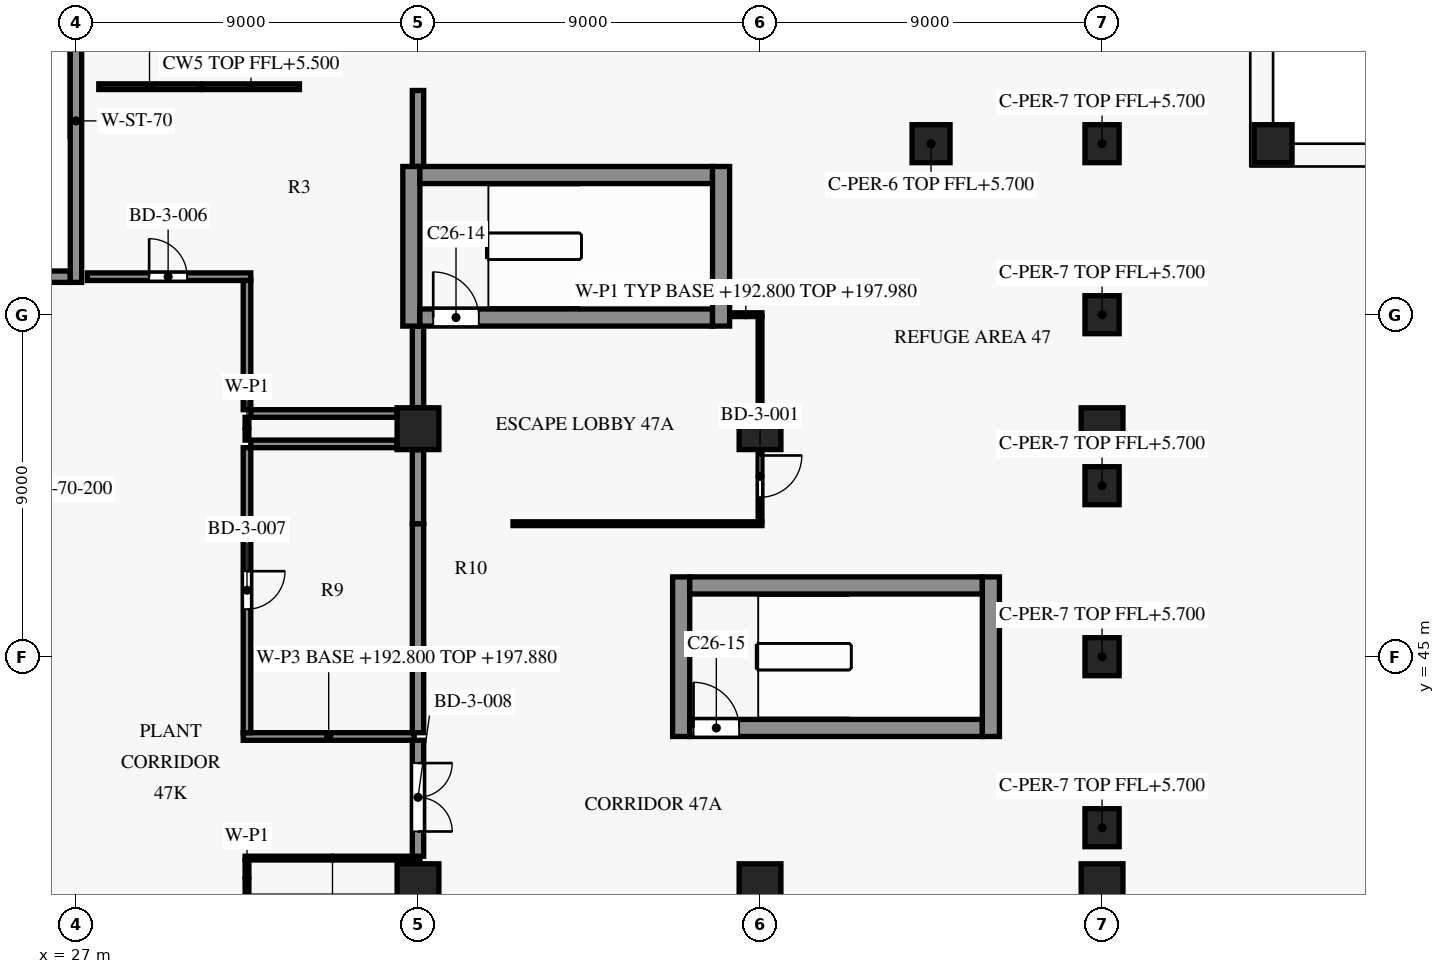
"""IFC4 building model, lengths in metres.
Left out: names, types, materials, properties, quantities, classifications, styles, units other than length and angle.
Written with IfcOpenShell. Run it as: python <this file> out.ifc"""

import sys

from ifc_helpers import new_model, si_unit, direction, frame, frame_2d, origin, origin_2d, place, context, subcontext, project, spatial, rectangle, extrude, element, fill, save


model = new_model("IFC4")
c1 = context("Model", 3, precision=1e-05, world=origin(), true_north=direction((0.0, 1.0)))
c2 = subcontext(c1, "Body", "Model", "MODEL_VIEW")
j1 = project(units=[si_unit("LENGTHUNIT", "METRE"), si_unit("PLANEANGLEUNIT", "RADIAN")], contexts=[c1])
p1 = place(None, origin())
s1 = spatial("IfcSite", under=j1, at=p1, CompositionType="ELEMENT")
p2 = place(p1, origin())
s2 = spatial("IfcBuilding", under=s1, at=p2, CompositionType="ELEMENT")
p3 = place(p2, frame((0.0, 0.0, 192.8)))
s3 = spatial("IfcBuildingStorey", under=s2, at=p3, CompositionType="ELEMENT", Elevation=192.8)
p4 = place(p3, frame((58.5, 58.5, 0.0), z_axis=(0.0, 0.0, 1.0), x_axis=(1.0, 0.0, 0.0)))
e1 = element("IfcColumn", 1, at=p4, inside=s3, PredefinedType="COLUMN", context=c2, shape_type="SweptSolid", body=[
    extrude(rectangle(XDim=1.0, YDim=1.0, at=origin_2d()), origin(), (0.0, 0.0, 1.0), 6.0),
])
for number, where, z_axis, x_axis in (
    (2, (36.0, 39.0, 0.0), (0.0, 0.0, 1.0), (1.0, 0.0, 0.0)),
    (3, (36.0, 51.0, 0.0), (0.0, 0.0, 1.0), (1.0, 0.0, 0.0)),
    (4, (45.0, 39.0, 0.0), (0.0, 0.0, 1.0), (1.0, 0.0, 0.0)),
    (5, (45.0, 51.0, 0.0), (0.0, 0.0, 1.0), (1.0, 0.0, 0.0)),
    (6, (54.0, 39.0, 0.0), (0.0, 0.0, 1.0), (1.0, 0.0, 0.0)),
    (7, (54.0, 51.0, 0.0), (0.0, 0.0, 1.0), (1.0, 0.0, 0.0)),
):
    element("IfcColumn", number, at=place(p3, frame(where, z_axis=z_axis, x_axis=x_axis)), inside=s3, PredefinedType="COLUMN", context=c2, shape_type="SweptSolid", body=[
        extrude(rectangle(XDim=1.1, YDim=1.1, at=origin_2d()), origin(), (0.0, 0.0, 1.0), 6.0),
    ])
p5 = place(p3, frame((43.15, 43.125, 0.0), z_axis=(0.0, 0.0, 1.0), x_axis=(1.0, 0.0, 0.0)))
e8 = element("IfcWall", 8, at=p5, inside=s3, PredefinedType="SHEAR", context=c2, shape_type="SweptSolid", body=[
    extrude(rectangle(XDim=7.7, YDim=0.45, at=frame_2d((3.85, 0.0))), origin(), (0.0, 0.0, 1.0), 5.7),
])
p6 = place(p5, frame((0.1, 0.0, 0.0)))
e9 = element("IfcOpeningElement", 9, at=p6, cuts=e8, PredefinedType="OPENING", context=c2, shape_type="SweptSolid", body=[
    extrude(rectangle(XDim=1.2, YDim=2.2, at=frame_2d((0.6, 1.1))), frame((0.0, 0.235, 0.0), z_axis=(0.0, -1.0, 0.0), x_axis=(1.0, 0.0, 0.0)), (0.0, 0.0, 1.0), 0.47),
])
p7 = place(p3, frame((43.15, 46.875, 0.0), z_axis=(0.0, 0.0, 1.0), x_axis=(1.0, 0.0, 0.0)))
e10 = element("IfcWall", 10, at=p7, inside=s3, PredefinedType="SHEAR", context=c2, shape_type="SweptSolid", body=[
    extrude(rectangle(XDim=7.7, YDim=0.45, at=frame_2d((3.85, 0.0))), origin(), (0.0, 0.0, 1.0), 5.7),
])
p8 = place(p3, frame((36.05, 53.925, 0.0), z_axis=(0.0, 0.0, 1.0), x_axis=(1.0, 0.0, 0.0)))
e11 = element("IfcWall", 11, at=p8, inside=s3, PredefinedType="SHEAR", context=c2, shape_type="SweptSolid", body=[
    extrude(rectangle(XDim=7.7, YDim=0.45, at=frame_2d((3.85, 0.0))), origin(), (0.0, 0.0, 1.0), 5.7),
])
p9 = place(p8, frame((0.35, 0.0, 0.0)))
e12 = element("IfcOpeningElement", 12, at=p9, cuts=e11, PredefinedType="OPENING", context=c2, shape_type="SweptSolid", body=[
    extrude(rectangle(XDim=1.2, YDim=2.2, at=frame_2d((0.6, 1.1))), frame((0.0, 0.235, 0.0), z_axis=(0.0, -1.0, 0.0), x_axis=(1.0, 0.0, 0.0)), (0.0, 0.0, 1.0), 0.47),
])
p10 = place(p3, frame((23.4, 55.0, 0.0), z_axis=(0.0, 0.0, 1.0), x_axis=(1.0, 0.0, 0.0)))
e13 = element("IfcWall", 13, at=p10, inside=s3, PredefinedType="SHEAR", context=c2, shape_type="SweptSolid", body=[
    extrude(rectangle(XDim=3.45, YDim=0.3, at=frame_2d((1.725, 0.0))), origin(), (0.0, 0.0, 1.0), 5.7),
])
p11 = place(p3, frame((36.05, 57.675, 0.0), z_axis=(0.0, 0.0, 1.0), x_axis=(1.0, 0.0, 0.0)))
e14 = element("IfcWall", 14, at=p11, inside=s3, PredefinedType="SHEAR", context=c2, shape_type="SweptSolid", body=[
    extrude(rectangle(XDim=7.7, YDim=0.45, at=frame_2d((3.85, 0.0))), origin(), (0.0, 0.0, 1.0), 5.7),
])
p12 = place(p3, frame((27.0, 54.85, 0.0), z_axis=(0.0, 0.0, 1.0), x_axis=(0.0, 1.0, 0.0)))
e15 = element("IfcWall", 15, at=p12, inside=s3, PredefinedType="SHEAR", context=c2, shape_type="SweptSolid", body=[
    extrude(rectangle(XDim=8.5, YDim=0.3, at=frame_2d((4.25, 0.0))), origin(), (0.0, 0.0, 1.0), 5.7),
])
p13 = place(p12, frame((6.55, 0.0, 0.0)))
e16 = element("IfcOpeningElement", 16, at=p13, cuts=e15, PredefinedType="OPENING", context=c2, shape_type="SweptSolid", body=[
    extrude(rectangle(XDim=1.2, YDim=2.2, at=frame_2d((0.6, 1.1))), frame((0.0, 0.16, 0.0), z_axis=(0.0, -1.0, 0.0), x_axis=(1.0, 0.0, 0.0)), (0.0, 0.0, 1.0), 0.32),
])
p14 = place(p3, frame((35.825, 53.7, 0.0), z_axis=(0.0, 0.0, 1.0), x_axis=(0.0, 1.0, 0.0)))
e17 = element("IfcWall", 17, at=p14, inside=s3, PredefinedType="SHEAR", context=c2, shape_type="SweptSolid", body=[
    extrude(rectangle(XDim=4.2, YDim=0.45, at=frame_2d((2.1, 0.0))), origin(), (0.0, 0.0, 1.0), 5.7),
])
p15 = place(p3, frame((42.925, 42.9, 0.0), z_axis=(0.0, 0.0, 1.0), x_axis=(0.0, 1.0, 0.0)))
e18 = element("IfcWall", 18, at=p15, inside=s3, PredefinedType="SHEAR", context=c2, shape_type="SweptSolid", body=[
    extrude(rectangle(XDim=4.2, YDim=0.45, at=frame_2d((2.1, 0.0))), origin(), (0.0, 0.0, 1.0), 5.7),
])
p16 = place(p3, frame((43.975, 53.7, 0.0), z_axis=(0.0, 0.0, 1.0), x_axis=(0.0, 1.0, 0.0)))
e19 = element("IfcWall", 19, at=p16, inside=s3, PredefinedType="SHEAR", context=c2, shape_type="SweptSolid", body=[
    extrude(rectangle(XDim=4.2, YDim=0.45, at=frame_2d((2.1, 0.0))), origin(), (0.0, 0.0, 1.0), 5.7),
])
p17 = place(p3, frame((51.075, 42.9, 0.0), z_axis=(0.0, 0.0, 1.0), x_axis=(0.0, 1.0, 0.0)))
e20 = element("IfcWall", 20, at=p17, inside=s3, PredefinedType="SHEAR", context=c2, shape_type="SweptSolid", body=[
    extrude(rectangle(XDim=4.2, YDim=0.45, at=frame_2d((2.1, 0.0))), origin(), (0.0, 0.0, 1.0), 5.7),
])
p18 = place(p3, frame((31.5, 39.65, 0.0), z_axis=(0.0, 0.0, 1.0), x_axis=(0.0, -1.0, 0.0)))
e21 = element("IfcWall", 21, at=p18, inside=s3, PredefinedType="PARTITIONING", context=c2, shape_type="SweptSolid", body=[
    extrude(rectangle(XDim=0.95, YDim=0.1, at=frame_2d((0.475, 0.0))), origin(), (0.0, 0.0, 1.0), 5.68),
])
p19 = place(p3, frame((36.05, 39.7, 0.0), z_axis=(0.0, 0.0, 1.0), x_axis=(-1.0, 0.0, 0.0)))
e22 = element("IfcWall", 22, at=p19, inside=s3, PredefinedType="PARTITIONING", context=c2, shape_type="SweptSolid", body=[
    extrude(rectangle(XDim=4.6, YDim=0.1, at=frame_2d((2.3, 0.0))), origin(), (0.0, 0.0, 1.0), 5.08),
])
p20 = place(p3, frame((36.0, 42.8, 0.0), z_axis=(0.0, 0.0, 1.0), x_axis=(0.0, -1.0, 0.0)))
e23 = element("IfcWall", 23, at=p20, inside=s3, PredefinedType="PARTITIONING", context=c2, shape_type="SweptSolid", body=[
    extrude(rectangle(XDim=3.05, YDim=0.3, at=frame_2d((1.525, 0.0))), origin(), (0.0, 0.0, 1.0), 5.08),
])
p21 = place(p20, frame((0.6, 0.0, 0.0)))
e24 = element("IfcOpeningElement", 24, at=p21, cuts=e23, PredefinedType="OPENING", context=c2, shape_type="SweptSolid", body=[
    extrude(rectangle(XDim=1.8, YDim=2.1, at=frame_2d((0.9, 1.05))), frame((0.0, 0.16, 0.0), z_axis=(0.0, -1.0, 0.0), x_axis=(1.0, 0.0, 0.0)), (0.0, 0.0, 1.0), 0.32),
])
p22 = place(p3, frame((31.4, 42.9, 0.0), z_axis=(0.0, 0.0, 1.0), x_axis=(1.0, 0.0, 0.0)))
e25 = element("IfcWall", 25, at=p22, inside=s3, PredefinedType="PARTITIONING", context=c2, shape_type="SweptSolid", body=[
    extrude(rectangle(XDim=4.5, YDim=0.2, at=frame_2d((2.25, 0.0))), origin(), (0.0, 0.0, 1.0), 5.08),
])
p23 = place(p3, frame((36.0, 48.5, 0.0), z_axis=(0.0, 0.0, 1.0), x_axis=(0.0, -1.0, 0.0)))
e26 = element("IfcWall", 26, at=p23, inside=s3, PredefinedType="PARTITIONING", context=c2, shape_type="SweptSolid", body=[
    extrude(rectangle(XDim=5.5, YDim=0.3, at=frame_2d((2.75, 0.0))), origin(), (0.0, 0.0, 1.0), 5.08),
])
p24 = place(p3, frame((36.0, 48.5, 0.0), z_axis=(0.0, 0.0, 1.0), x_axis=(0.0, 1.0, 0.0)))
e27 = element("IfcWall", 27, at=p24, inside=s3, PredefinedType="PARTITIONING", context=c2, shape_type="SweptSolid", body=[
    extrude(rectangle(XDim=1.945, YDim=0.3, at=frame_2d((0.973, 0.0))), origin(), (0.0, 0.0, 1.0), 5.08),
])
p25 = place(p3, frame((45.05, 48.5, 0.0), z_axis=(0.0, 0.0, 1.0), x_axis=(-1.0, 0.0, 0.0)))
e28 = element("IfcWall", 28, at=p25, inside=s3, PredefinedType="PARTITIONING", context=c2, shape_type="SweptSolid", body=[
    extrude(rectangle(XDim=6.55, YDim=0.1, at=frame_2d((3.275, 0.0))), origin(), (0.0, 0.0, 1.0), 5.18),
])
p26 = place(p3, frame((45.0, 50.445, 0.0), z_axis=(0.0, 0.0, 1.0), x_axis=(0.0, -1.0, 0.0)))
e29 = element("IfcWall", 29, at=p26, inside=s3, PredefinedType="PARTITIONING", context=c2, shape_type="SweptSolid", body=[
    extrude(rectangle(XDim=1.895, YDim=0.1, at=frame_2d((0.948, 0.0))), origin(), (0.0, 0.0, 1.0), 5.18),
])
p27 = place(p26, frame((0.15, 0.0, 0.0)))
e30 = element("IfcOpeningElement", 30, at=p27, cuts=e29, PredefinedType="OPENING", context=c2, shape_type="SweptSolid", body=[
    extrude(rectangle(XDim=1.1, YDim=2.1, at=frame_2d((0.55, 1.05))), frame((0.0, 0.06, 0.0), z_axis=(0.0, -1.0, 0.0), x_axis=(1.0, 0.0, 0.0)), (0.0, 0.0, 1.0), 0.12),
])
p28 = place(p3, frame((31.5, 50.5, 0.0), z_axis=(0.0, 0.0, 1.0), x_axis=(0.0, -1.0, 0.0)))
e31 = element("IfcWall", 31, at=p28, inside=s3, PredefinedType="PARTITIONING", context=c2, shape_type="SweptSolid", body=[
    extrude(rectangle(XDim=7.5, YDim=0.2, at=frame_2d((3.75, 0.0))), origin(), (0.0, 0.0, 1.0), 5.68),
])
p29 = place(p28, frame((3.25, 0.0, 0.0)))
e32 = element("IfcOpeningElement", 32, at=p29, cuts=e31, PredefinedType="OPENING", context=c2, shape_type="SweptSolid", body=[
    extrude(rectangle(XDim=1.0, YDim=2.1, at=frame_2d((0.5, 1.05))), frame((0.0, 0.11, 0.0), z_axis=(0.0, -1.0, 0.0), x_axis=(1.0, 0.0, 0.0)), (0.0, 0.0, 1.0), 0.22),
])
p30 = place(p3, frame((31.6, 50.6, 0.0), z_axis=(0.0, 0.0, 1.0), x_axis=(1.0, 0.0, 0.0)))
e33 = element("IfcWall", 33, at=p30, inside=s3, PredefinedType="PARTITIONING", context=c2, shape_type="SweptSolid", body=[
    extrude(rectangle(XDim=3.845, YDim=0.2, at=frame_2d((1.922, 0.0))), origin(), (0.0, 0.0, 1.0), 5.68),
])
p31 = place(p3, frame((31.5, 51.3, 0.0), z_axis=(0.0, 0.0, 1.0), x_axis=(0.0, -1.0, 0.0)))
e34 = element("IfcWall", 34, at=p31, inside=s3, PredefinedType="PARTITIONING", context=c2, shape_type="SweptSolid", body=[
    extrude(rectangle(XDim=0.6, YDim=0.1, at=frame_2d((0.3, 0.0))), origin(), (0.0, 0.0, 1.0), 5.68),
])
p32 = place(p3, frame((35.445, 51.4, 0.0), z_axis=(0.0, 0.0, 1.0), x_axis=(-1.0, 0.0, 0.0)))
e35 = element("IfcWall", 35, at=p32, inside=s3, PredefinedType="PARTITIONING", context=c2, shape_type="SweptSolid", body=[
    extrude(rectangle(XDim=3.845, YDim=0.2, at=frame_2d((1.922, 0.0))), origin(), (0.0, 0.0, 1.0), 5.68),
])
p33 = place(p3, frame((36.0, 51.555, 0.0), z_axis=(0.0, 0.0, 1.0), x_axis=(0.0, 1.0, 0.0)))
e36 = element("IfcWall", 36, at=p33, inside=s3, PredefinedType="PARTITIONING", context=c2, shape_type="SweptSolid", body=[
    extrude(rectangle(XDim=2.145, YDim=0.3, at=frame_2d((1.073, 0.0))), origin(), (0.0, 0.0, 1.0), 5.08),
])
p34 = place(p3, frame((45.0, 53.95, 0.0), z_axis=(0.0, 0.0, 1.0), x_axis=(0.0, -1.0, 0.0)))
e37 = element("IfcWall", 37, at=p34, inside=s3, PredefinedType="PARTITIONING", context=c2, shape_type="SweptSolid", body=[
    extrude(rectangle(XDim=2.395, YDim=0.1, at=frame_2d((1.198, 0.0))), origin(), (0.0, 0.0, 1.0), 5.18),
])
p35 = place(p3, frame((44.2, 54.0, 0.0), z_axis=(0.0, 0.0, 1.0), x_axis=(1.0, 0.0, 0.0)))
e38 = element("IfcWall", 38, at=p35, inside=s3, PredefinedType="PARTITIONING", context=c2, shape_type="SweptSolid", body=[
    extrude(rectangle(XDim=0.85, YDim=0.1, at=frame_2d((0.425, 0.0))), origin(), (0.0, 0.0, 1.0), 5.18),
])
p36 = place(p3, frame((31.5, 54.9, 0.0), z_axis=(0.0, 0.0, 1.0), x_axis=(0.0, -1.0, 0.0)))
e39 = element("IfcWall", 39, at=p36, inside=s3, PredefinedType="PARTITIONING", context=c2, shape_type="SweptSolid", body=[
    extrude(rectangle(XDim=3.4, YDim=0.2, at=frame_2d((1.7, 0.0))), origin(), (0.0, 0.0, 1.0), 5.68),
])
p37 = place(p3, frame((27.3, 55.0, 0.0), z_axis=(0.0, 0.0, 1.0), x_axis=(1.0, 0.0, 0.0)))
e40 = element("IfcWall", 40, at=p37, inside=s3, PredefinedType="PARTITIONING", context=c2, shape_type="SweptSolid", body=[
    extrude(rectangle(XDim=4.3, YDim=0.2, at=frame_2d((2.15, 0.0))), origin(), (0.0, 0.0, 1.0), 5.68),
])
p38 = place(p37, frame((1.625, 0.0, 0.0)))
e41 = element("IfcOpeningElement", 41, at=p38, cuts=e40, PredefinedType="OPENING", context=c2, shape_type="SweptSolid", body=[
    extrude(rectangle(XDim=1.0, YDim=2.1, at=frame_2d((0.5, 1.05))), frame((0.0, 0.11, 0.0), z_axis=(0.0, -1.0, 0.0), x_axis=(1.0, 0.0, 0.0)), (0.0, 0.0, 1.0), 0.22),
])
p39 = place(p3, frame((36.0, 59.9, 0.0), z_axis=(0.0, 0.0, 1.0), x_axis=(0.0, -1.0, 0.0)))
e42 = element("IfcWall", 42, at=p39, inside=s3, PredefinedType="PARTITIONING", context=c2, shape_type="SweptSolid", body=[
    extrude(rectangle(XDim=2.0, YDim=0.3, at=frame_2d((1.0, 0.0))), origin(), (0.0, 0.0, 1.0), 5.08),
])
p40 = place(p3, frame((49.5, 58.5, 0.0), z_axis=(0.0, 0.0, 1.0), x_axis=(1.0, 0.0, 0.0)))
e43 = element("IfcColumn", 43, at=p40, inside=s3, PredefinedType="COLUMN", context=c2, shape_type="SweptSolid", body=[
    extrude(rectangle(XDim=1.0, YDim=1.0, at=origin_2d()), origin(), (0.0, 0.0, 1.0), 5.7),
])
for number, where, z_axis, x_axis in (
    (44, (54.0, 40.5, 0.0), (0.0, 0.0, 1.0), (0.0, 1.0, 0.0)),
    (45, (54.0, 45.0, 0.0), (0.0, 0.0, 1.0), (0.0, 1.0, 0.0)),
    (46, (54.0, 49.5, 0.0), (0.0, 0.0, 1.0), (0.0, 1.0, 0.0)),
    (47, (54.0, 54.0, 0.0), (0.0, 0.0, 1.0), (0.0, 1.0, 0.0)),
    (48, (54.0, 58.5, 0.0), (0.0, 0.0, 1.0), (0.0, 1.0, 0.0)),
):
    element("IfcColumn", number, at=place(p3, frame(where, z_axis=z_axis, x_axis=x_axis)), inside=s3, PredefinedType="COLUMN", context=c2, shape_type="SweptSolid", body=[
        extrude(rectangle(XDim=0.9, YDim=1.0, at=origin_2d()), origin(), (0.0, 0.0, 1.0), 5.7),
    ])
p41 = place(p9, origin())
e49 = element("IfcDoor", 49, at=p41, inside=s3, OperationType="SINGLE_SWING_LEFT", PredefinedType="DOOR", context=c2, shape_type="SweptSolid", body=[
    extrude(rectangle(XDim=1.2, YDim=2.2, at=frame_2d((0.6, 1.1))), frame((0.0, 0.025, 0.0), z_axis=(0.0, -1.0, 0.0), x_axis=(1.0, 0.0, 0.0)), (0.0, 0.0, 1.0), 0.05),
])
fill(e12, e49)
p42 = place(p6, origin())
e50 = element("IfcDoor", 50, at=p42, inside=s3, OperationType="SINGLE_SWING_RIGHT", PredefinedType="DOOR", context=c2, shape_type="SweptSolid", body=[
    extrude(rectangle(XDim=1.2, YDim=2.2, at=frame_2d((0.6, 1.1))), frame((0.0, 0.025, 0.0), z_axis=(0.0, -1.0, 0.0), x_axis=(1.0, 0.0, 0.0)), (0.0, 0.0, 1.0), 0.05),
])
fill(e9, e50)
p43 = place(p27, origin())
e51 = element("IfcDoor", 51, at=p43, inside=s3, OperationType="SINGLE_SWING_RIGHT", PredefinedType="DOOR", context=c2, shape_type="SweptSolid", body=[
    extrude(rectangle(XDim=1.1, YDim=2.1, at=frame_2d((0.55, 1.05))), frame((0.0, 0.025, 0.0), z_axis=(0.0, -1.0, 0.0), x_axis=(1.0, 0.0, 0.0)), (0.0, 0.0, 1.0), 0.05),
])
fill(e30, e51)
p44 = place(p38, origin())
e52 = element("IfcDoor", 52, at=p44, inside=s3, OperationType="SINGLE_SWING_LEFT", PredefinedType="DOOR", context=c2, shape_type="SweptSolid", body=[
    extrude(rectangle(XDim=1.0, YDim=2.1, at=frame_2d((0.5, 1.05))), frame((0.0, 0.025, 0.0), z_axis=(0.0, -1.0, 0.0), x_axis=(1.0, 0.0, 0.0)), (0.0, 0.0, 1.0), 0.05),
])
fill(e41, e52)
p45 = place(p29, origin())
e53 = element("IfcDoor", 53, at=p45, inside=s3, OperationType="SINGLE_SWING_LEFT", PredefinedType="DOOR", context=c2, shape_type="SweptSolid", body=[
    extrude(rectangle(XDim=1.0, YDim=2.1, at=frame_2d((0.5, 1.05))), frame((0.0, 0.025, 0.0), z_axis=(0.0, -1.0, 0.0), x_axis=(1.0, 0.0, 0.0)), (0.0, 0.0, 1.0), 0.05),
])
fill(e32, e53)
p46 = place(p21, origin())
e54 = element("IfcDoor", 54, at=p46, inside=s3, OperationType="DOUBLE_DOOR_SINGLE_SWING", PredefinedType="DOOR", context=c2, shape_type="SweptSolid", body=[
    extrude(rectangle(XDim=1.8, YDim=2.1, at=frame_2d((0.9, 1.05))), frame((0.0, 0.025, 0.0), z_axis=(0.0, -1.0, 0.0), x_axis=(1.0, 0.0, 0.0)), (0.0, 0.0, 1.0), 0.05),
])
fill(e24, e54)
save(model, sys.argv[1])
